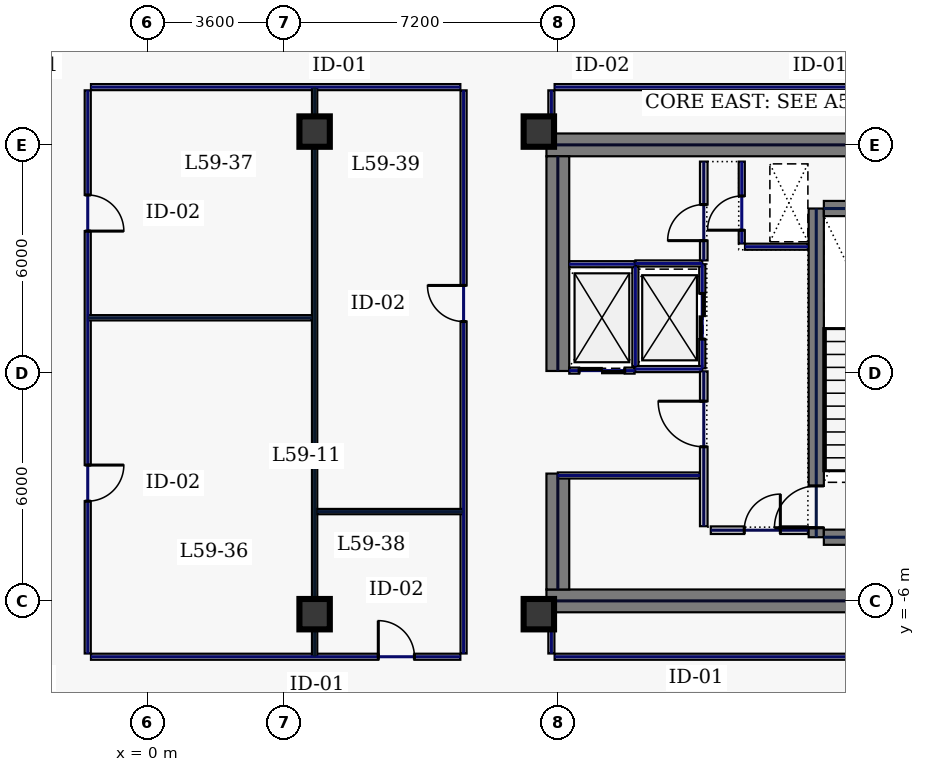
"""IFC4 building model, lengths in metres.
Left out: names, types, materials, properties, quantities, classifications, styles, units other than length and angle.
Written with IfcOpenShell. Run it as: python <this file> out.ifc"""

import sys

from ifc_helpers import new_model, si_unit, direction, frame, frame_2d, origin, origin_2d, place, context, subcontext, project, spatial, rectangle, hollow_rectangle, extrude, element, fill, save


model = new_model("IFC4")
c1 = context("Model", 3, precision=1e-05, world=origin(), true_north=direction((0.0, 1.0)))
c2 = subcontext(c1, "Body", "Model", "MODEL_VIEW")
j1 = project(units=[si_unit("LENGTHUNIT", "METRE"), si_unit("PLANEANGLEUNIT", "RADIAN")], contexts=[c1])
p1 = place(None, origin())
s1 = spatial("IfcSite", under=j1, at=p1, CompositionType="ELEMENT")
p2 = place(p1, origin())
s2 = spatial("IfcBuilding", under=s1, at=p2, CompositionType="ELEMENT")
p3 = place(p2, frame((0.0, 0.0, 255.0)))
s3 = spatial("IfcBuildingStorey", under=s2, at=p3, CompositionType="ELEMENT", Elevation=255.0)
for number, where, z_axis, x_axis in (
    (1, (10.5, 6.0, 0.0), (0.0, 0.0, 1.0), (1.0, 0.0, 0.0)),
    (2, (10.5, -6.0, 0.0), (0.0, 0.0, 1.0), (1.0, 0.0, 0.0)),
):
    element("IfcWall", number, at=place(p3, frame(where, z_axis=z_axis, x_axis=x_axis)), inside=s3, PredefinedType="SHEAR", context=c2, shape_type="SweptSolid", body=[
        extrude(rectangle(XDim=11.5, YDim=0.6, at=frame_2d((5.75, 0.0))), origin(), (0.0, 0.0, 1.0), 3.74),
    ])
p4 = place(p3, frame((10.8, -5.7, 0.0), z_axis=(0.0, 0.0, 1.0), x_axis=(0.0, 1.0, 0.0)))
e3 = element("IfcWall", 3, at=p4, inside=s3, PredefinedType="SHEAR", context=c2, shape_type="SweptSolid", body=[
    extrude(rectangle(XDim=3.05, YDim=0.6, at=frame_2d((1.525, 0.0))), origin(), (0.0, 0.0, 1.0), 3.74),
])
p5 = place(p3, frame((10.8, 0.05, 0.0), z_axis=(0.0, 0.0, 1.0), x_axis=(0.0, 1.0, 0.0)))
e4 = element("IfcWall", 4, at=p5, inside=s3, PredefinedType="SHEAR", context=c2, shape_type="SweptSolid", body=[
    extrude(rectangle(XDim=5.65, YDim=0.6, at=frame_2d((2.825, 0.0))), origin(), (0.0, 0.0, 1.0), 3.74),
])
p6 = place(p3, frame((17.6, -4.325, 0.0), z_axis=(0.0, 0.0, 1.0), x_axis=(0.0, 1.0, 0.0)))
e5 = element("IfcWall", 5, at=p6, inside=s3, PredefinedType="SHEAR", context=c2, shape_type="SweptSolid", body=[
    extrude(rectangle(XDim=8.65, YDim=0.4, at=frame_2d((4.325, 0.0))), origin(), (0.0, 0.0, 1.0), 3.74),
])
p7 = place(p6, frame((0.25, 0.0, 0.0)))
e6 = element("IfcOpeningElement", 6, at=p7, cuts=e5, PredefinedType="OPENING", context=c2, shape_type="SweptSolid", body=[
    extrude(rectangle(XDim=1.1, YDim=2.2, at=frame_2d((0.55, 1.1))), frame((0.0, 0.21, 0.0), z_axis=(0.0, -1.0, 0.0), x_axis=(1.0, 0.0, 0.0)), (0.0, 0.0, 1.0), 0.42),
])
for number, where, z_axis, x_axis in (
    (7, (17.8, -4.325, 0.0), (0.0, 0.0, 1.0), (1.0, 0.0, 0.0)),
    (8, (17.8, 4.325, 0.0), (0.0, 0.0, 1.0), (1.0, 0.0, 0.0)),
):
    element("IfcWall", number, at=place(p3, frame(where, z_axis=z_axis, x_axis=x_axis)), inside=s3, PredefinedType="SHEAR", context=c2, shape_type="SweptSolid", body=[
        extrude(rectangle(XDim=3.4, YDim=0.4, at=frame_2d((1.7, 0.0))), origin(), (0.0, 0.0, 1.0), 3.74),
    ])
for number, where, z_axis, x_axis in (
    (9, (10.3, -6.35, 0.0), (0.0, 0.0, 1.0), (1.0, 0.0, 0.0)),
    (10, (10.3, 6.35, 0.0), (0.0, 0.0, 1.0), (1.0, 0.0, 0.0)),
    (11, (4.4, -6.35, 0.0), (0.0, 0.0, 1.0), (1.0, 0.0, 0.0)),
    (12, (4.4, 6.35, 0.0), (0.0, 0.0, 1.0), (1.0, 0.0, 0.0)),
):
    element("IfcColumn", number, at=place(p3, frame(where, z_axis=z_axis, x_axis=x_axis)), inside=s3, PredefinedType="COLUMN", context=c2, shape_type="SweptSolid", body=[
        extrude(hollow_rectangle(XDim=0.8, YDim=0.8, WallThickness=0.036, at=origin_2d()), origin(), (0.0, 0.0, 1.0), 3.74),
    ])
p8 = place(p3, frame((14.6, 0.12, 0.0), z_axis=(0.0, 0.0, 1.0), x_axis=(0.0, 1.0, 0.0)))
e13 = element("IfcWall", 13, at=p8, inside=s3, PredefinedType="PARTITIONING", context=c2, shape_type="SweptSolid", body=[
    extrude(rectangle(XDim=2.74, YDim=0.16, at=frame_2d((1.37, 0.0))), origin(), (0.0, 0.0, 1.0), 3.74),
])
p9 = place(p8, frame((0.77, 0.0, 0.0)))
e14 = element("IfcOpeningElement", 14, at=p9, cuts=e13, PredefinedType="OPENING", context=c2, shape_type="SweptSolid", body=[
    extrude(rectangle(XDim=1.2, YDim=2.2, at=frame_2d((0.6, 1.1))), frame((0.0, 0.09, 0.0), z_axis=(0.0, -1.0, 0.0), x_axis=(1.0, 0.0, 0.0)), (0.0, 0.0, 1.0), 0.18),
])
for number, where, z_axis, x_axis in (
    (15, (12.84, 0.1, 0.0), (0.0, 0.0, 1.0), (1.0, 0.0, 0.0)),
    (16, (12.84, 2.88, 0.0), (0.0, 0.0, 1.0), (1.0, 0.0, 0.0)),
):
    element("IfcWall", number, at=place(p3, frame(where, z_axis=z_axis, x_axis=x_axis)), inside=s3, PredefinedType="PARTITIONING", context=c2, shape_type="SweptSolid", body=[
        extrude(rectangle(XDim=1.76, YDim=0.16, at=frame_2d((0.88, 0.0))), origin(), (0.0, 0.0, 1.0), 3.74),
    ])
p10 = place(p3, frame((12.84, 0.18, 0.0), z_axis=(0.0, 0.0, 1.0), x_axis=(0.0, 1.0, 0.0)))
e17 = element("IfcWall", 17, at=p10, inside=s3, PredefinedType="PARTITIONING", context=c2, shape_type="SweptSolid", body=[
    extrude(rectangle(XDim=2.62, YDim=0.16, at=frame_2d((1.31, 0.0))), origin(), (0.0, 0.0, 1.0), 3.74),
])
p11 = place(p3, frame((11.1, 0.06, 0.0), z_axis=(0.0, 0.0, 1.0), x_axis=(1.0, 0.0, 0.0)))
e18 = element("IfcWall", 18, at=p11, inside=s3, PredefinedType="PARTITIONING", context=c2, shape_type="SweptSolid", body=[
    extrude(rectangle(XDim=1.72, YDim=0.16, at=frame_2d((0.86, 0.0))), origin(), (0.0, 0.0, 1.0), 3.74),
])
p12 = place(p11, frame((0.26, 0.0, 0.0)))
e19 = element("IfcOpeningElement", 19, at=p12, cuts=e18, PredefinedType="OPENING", context=c2, shape_type="SweptSolid", body=[
    extrude(rectangle(XDim=1.2, YDim=2.2, at=frame_2d((0.6, 1.1))), frame((0.0, 0.09, 0.0), z_axis=(0.0, -1.0, 0.0), x_axis=(1.0, 0.0, 0.0)), (0.0, 0.0, 1.0), 0.18),
])
p13 = place(p3, frame((11.1, 2.86, 0.0), z_axis=(0.0, 0.0, 1.0), x_axis=(1.0, 0.0, 0.0)))
e20 = element("IfcWall", 20, at=p13, inside=s3, PredefinedType="PARTITIONING", context=c2, shape_type="SweptSolid", body=[
    extrude(rectangle(XDim=1.72, YDim=0.16, at=frame_2d((0.86, 0.0))), origin(), (0.0, 0.0, 1.0), 3.74),
])
p14 = place(p3, frame((15.64, 3.405, 0.0), z_axis=(0.0, 0.0, 1.0), x_axis=(0.0, 1.0, 0.0)))
e21 = element("IfcWall", 21, at=p14, inside=s3, PredefinedType="PARTITIONING", context=c2, shape_type="SweptSolid", body=[
    extrude(rectangle(XDim=2.155, YDim=0.16, at=frame_2d((1.078, 0.0))), origin(), (0.0, 0.0, 1.0), 3.74),
])
p15 = place(p14, frame((0.35, 0.0, 0.0)))
e22 = element("IfcOpeningElement", 22, at=p15, cuts=e21, PredefinedType="OPENING", context=c2, shape_type="SweptSolid", body=[
    extrude(rectangle(XDim=0.9, YDim=2.2, at=frame_2d((0.45, 1.1))), frame((0.0, 0.09, 0.0), z_axis=(0.0, -1.0, 0.0), x_axis=(1.0, 0.0, 0.0)), (0.0, 0.0, 1.0), 0.18),
])
p16 = place(p3, frame((15.725, 3.32, 0.0), z_axis=(0.0, 0.0, 1.0), x_axis=(1.0, 0.0, 0.0)))
e23 = element("IfcWall", 23, at=p16, inside=s3, PredefinedType="PARTITIONING", context=c2, shape_type="SweptSolid", body=[
    extrude(rectangle(XDim=1.655, YDim=0.16, at=frame_2d((0.827, 0.0))), origin(), (0.0, 0.0, 1.0), 3.74),
])
p17 = place(p3, frame((14.825, -4.14, 0.0), z_axis=(0.0, 0.0, 1.0), x_axis=(1.0, 0.0, 0.0)))
e24 = element("IfcWall", 24, at=p17, inside=s3, PredefinedType="SOLIDWALL", context=c2, shape_type="SweptSolid", body=[
    extrude(rectangle(XDim=2.555, YDim=0.2, at=frame_2d((1.277, 0.0))), origin(), (0.0, 0.0, 1.0), 3.74),
])
p18 = place(p17, frame((0.88, 0.0, 0.0)))
e25 = element("IfcOpeningElement", 25, at=p18, cuts=e24, PredefinedType="OPENING", context=c2, shape_type="SweptSolid", body=[
    extrude(rectangle(XDim=0.95, YDim=2.2, at=frame_2d((0.475, 1.1))), frame((0.0, 0.11, 0.0), z_axis=(0.0, -1.0, 0.0), x_axis=(1.0, 0.0, 0.0)), (0.0, 0.0, 1.0), 0.22),
])
p19 = place(p3, frame((10.8, -2.7, 0.0), z_axis=(0.0, 0.0, 1.0), x_axis=(1.0, 0.0, 0.0)))
e26 = element("IfcWall", 26, at=p19, inside=s3, PredefinedType="PARTITIONING", context=c2, shape_type="SweptSolid", body=[
    extrude(rectangle(XDim=3.735, YDim=0.16, at=frame_2d((1.867, 0.0))), origin(), (0.0, 0.0, 1.0), 3.74),
])
p20 = place(p3, frame((14.64, 2.96, 0.0), z_axis=(0.0, 0.0, 1.0), x_axis=(0.0, 1.0, 0.0)))
e27 = element("IfcWall", 27, at=p20, inside=s3, PredefinedType="SOLIDWALL", context=c2, shape_type="SweptSolid", body=[
    extrude(rectangle(XDim=2.6, YDim=0.2, at=frame_2d((1.3, 0.0))), origin(), (0.0, 0.0, 1.0), 3.74),
])
p21 = place(p20, frame((0.52, 0.0, 0.0)))
e28 = element("IfcOpeningElement", 28, at=p21, cuts=e27, PredefinedType="OPENING", context=c2, shape_type="SweptSolid", body=[
    extrude(rectangle(XDim=0.95, YDim=2.2, at=frame_2d((0.475, 1.1))), frame((0.0, 0.11, 0.0), z_axis=(0.0, -1.0, 0.0), x_axis=(1.0, 0.0, 0.0)), (0.0, 0.0, 1.0), 0.22),
])
p22 = place(p3, frame((14.64, -4.035, 0.0), z_axis=(0.0, 0.0, 1.0), x_axis=(0.0, 1.0, 0.0)))
e29 = element("IfcWall", 29, at=p22, inside=s3, PredefinedType="SOLIDWALL", context=c2, shape_type="SweptSolid", body=[
    extrude(rectangle(XDim=4.075, YDim=0.2, at=frame_2d((2.038, 0.0))), origin(), (0.0, 0.0, 1.0), 3.74),
])
p23 = place(p22, frame((2.09, 0.0, 0.0)))
e30 = element("IfcOpeningElement", 30, at=p23, cuts=e29, PredefinedType="OPENING", context=c2, shape_type="SweptSolid", body=[
    extrude(rectangle(XDim=1.2, YDim=2.2, at=frame_2d((0.6, 1.1))), frame((0.0, 0.11, 0.0), z_axis=(0.0, -1.0, 0.0), x_axis=(1.0, 0.0, 0.0)), (0.0, 0.0, 1.0), 0.22),
])
p24 = place(p3, frame((22.585, 7.52, 0.0), z_axis=(0.0, 0.0, 1.0), x_axis=(-1.0, 0.0, 0.0)))
e31 = element("IfcWall", 31, at=p24, inside=s3, PredefinedType="PARTITIONING", context=c2, shape_type="SweptSolid", body=[
    extrude(rectangle(XDim=11.87, YDim=0.16, at=frame_2d((5.935, 0.0))), origin(), (0.0, 0.0, 1.0), 3.74),
])
p25 = place(p3, frame((10.63, 7.435, 0.0), z_axis=(0.0, 0.0, 1.0), x_axis=(0.0, -1.0, 0.0)))
e32 = element("IfcWall", 32, at=p25, inside=s3, PredefinedType="PARTITIONING", context=c2, shape_type="SweptSolid", body=[
    extrude(rectangle(XDim=1.015, YDim=0.16, at=frame_2d((0.508, 0.0))), origin(), (0.0, 0.0, 1.0), 3.74),
])
p26 = place(p3, frame((10.63, -6.42, 0.0), z_axis=(0.0, 0.0, 1.0), x_axis=(0.0, -1.0, 0.0)))
e33 = element("IfcWall", 33, at=p26, inside=s3, PredefinedType="PARTITIONING", context=c2, shape_type="SweptSolid", body=[
    extrude(rectangle(XDim=0.965, YDim=0.16, at=frame_2d((0.482, 0.0))), origin(), (0.0, 0.0, 1.0), 3.74),
])
p27 = place(p3, frame((10.715, -7.47, 0.0), z_axis=(0.0, 0.0, 1.0), x_axis=(1.0, 0.0, 0.0)))
e34 = element("IfcWall", 34, at=p27, inside=s3, PredefinedType="PARTITIONING", context=c2, shape_type="SweptSolid", body=[
    extrude(rectangle(XDim=11.87, YDim=0.16, at=frame_2d((5.935, 0.0))), origin(), (0.0, 0.0, 1.0), 3.74),
])
p28 = place(p3, frame((8.235, 7.52, 0.0), z_axis=(0.0, 0.0, 1.0), x_axis=(-1.0, 0.0, 0.0)))
e35 = element("IfcWall", 35, at=p28, inside=s3, PredefinedType="PARTITIONING", context=c2, shape_type="SweptSolid", body=[
    extrude(rectangle(XDim=9.72, YDim=0.16, at=frame_2d((4.86, 0.0))), origin(), (0.0, 0.0, 1.0), 3.74),
])
p29 = place(p3, frame((-1.57, 7.435, 0.0), z_axis=(0.0, 0.0, 1.0), x_axis=(0.0, -1.0, 0.0)))
e36 = element("IfcWall", 36, at=p29, inside=s3, PredefinedType="PARTITIONING", context=c2, shape_type="SweptSolid", body=[
    extrude(rectangle(XDim=14.82, YDim=0.16, at=frame_2d((7.41, 0.0))), origin(), (0.0, 0.0, 1.0), 3.74),
])
p30 = place(p29, frame((9.861, 0.0, 0.0)))
e37 = element("IfcOpeningElement", 37, at=p30, cuts=e36, PredefinedType="OPENING", context=c2, shape_type="SweptSolid", body=[
    extrude(rectangle(XDim=0.95, YDim=2.2, at=frame_2d((0.475, 1.1))), frame((0.0, 0.09, 0.0), z_axis=(0.0, -1.0, 0.0), x_axis=(1.0, 0.0, 0.0)), (0.0, 0.0, 1.0), 0.18),
])
p31 = place(p29, frame((2.754, 0.0, 0.0)))
e38 = element("IfcOpeningElement", 38, at=p31, cuts=e36, PredefinedType="OPENING", context=c2, shape_type="SweptSolid", body=[
    extrude(rectangle(XDim=0.95, YDim=2.2, at=frame_2d((0.475, 1.1))), frame((0.0, 0.09, 0.0), z_axis=(0.0, -1.0, 0.0), x_axis=(1.0, 0.0, 0.0)), (0.0, 0.0, 1.0), 0.18),
])
p32 = place(p3, frame((-1.485, -7.47, 0.0), z_axis=(0.0, 0.0, 1.0), x_axis=(1.0, 0.0, 0.0)))
e39 = element("IfcWall", 39, at=p32, inside=s3, PredefinedType="PARTITIONING", context=c2, shape_type="SweptSolid", body=[
    extrude(rectangle(XDim=9.72, YDim=0.16, at=frame_2d((4.86, 0.0))), origin(), (0.0, 0.0, 1.0), 3.74),
])
p33 = place(p32, frame((7.561, 0.0, 0.0)))
e40 = element("IfcOpeningElement", 40, at=p33, cuts=e39, PredefinedType="OPENING", context=c2, shape_type="SweptSolid", body=[
    extrude(rectangle(XDim=0.95, YDim=2.2, at=frame_2d((0.475, 1.1))), frame((0.0, 0.09, 0.0), z_axis=(0.0, -1.0, 0.0), x_axis=(1.0, 0.0, 0.0)), (0.0, 0.0, 1.0), 0.18),
])
p34 = place(p3, frame((8.32, -7.385, 0.0), z_axis=(0.0, 0.0, 1.0), x_axis=(0.0, 1.0, 0.0)))
e41 = element("IfcWall", 41, at=p34, inside=s3, PredefinedType="PARTITIONING", context=c2, shape_type="SweptSolid", body=[
    extrude(rectangle(XDim=14.82, YDim=0.16, at=frame_2d((7.41, 0.0))), origin(), (0.0, 0.0, 1.0), 3.74),
])
p35 = place(p34, frame((8.736, 0.0, 0.0)))
e42 = element("IfcOpeningElement", 42, at=p35, cuts=e41, PredefinedType="OPENING", context=c2, shape_type="SweptSolid", body=[
    extrude(rectangle(XDim=0.95, YDim=2.2, at=frame_2d((0.475, 1.1))), frame((0.0, 0.09, 0.0), z_axis=(0.0, -1.0, 0.0), x_axis=(1.0, 0.0, 0.0)), (0.0, 0.0, 1.0), 0.18),
])
p36 = place(p3, frame((4.4, -7.465, 0.0), z_axis=(0.0, 0.0, 1.0), x_axis=(0.0, 1.0, 0.0)))
e43 = element("IfcWall", 43, at=p36, inside=s3, PredefinedType="PARTITIONING", context=c2, shape_type="SweptSolid", body=[
    extrude(rectangle(XDim=14.98, YDim=0.14, at=frame_2d((7.49, 0.0))), origin(), (0.0, 0.0, 1.0), 3.035),
])
p37 = place(p3, frame((-1.565, 1.45, 0.0), z_axis=(0.0, 0.0, 1.0), x_axis=(1.0, 0.0, 0.0)))
e44 = element("IfcWall", 44, at=p37, inside=s3, PredefinedType="PARTITIONING", context=c2, shape_type="SweptSolid", body=[
    extrude(rectangle(XDim=5.89, YDim=0.14, at=frame_2d((2.945, 0.0))), origin(), (0.0, 0.0, 1.0), 3.74),
])
p38 = place(p3, frame((4.475, -3.65, 0.0), z_axis=(0.0, 0.0, 1.0), x_axis=(1.0, 0.0, 0.0)))
e45 = element("IfcWall", 45, at=p38, inside=s3, PredefinedType="PARTITIONING", context=c2, shape_type="SweptSolid", body=[
    extrude(rectangle(XDim=3.84, YDim=0.14, at=frame_2d((1.92, 0.0))), origin(), (0.0, 0.0, 1.0), 3.74),
])
p39 = place(p7, origin())
e46 = element("IfcDoor", 46, at=p39, inside=s3, OperationType="SINGLE_SWING_LEFT", PredefinedType="DOOR", context=c2, shape_type="SweptSolid", body=[
    extrude(rectangle(XDim=1.1, YDim=2.2, at=frame_2d((0.55, 1.1))), frame((0.0, 0.025, 0.0), z_axis=(0.0, -1.0, 0.0), x_axis=(1.0, 0.0, 0.0)), (0.0, 0.0, 1.0), 0.05),
])
fill(e6, e46)
p40 = place(p9, origin())
e47 = element("IfcDoor", 47, at=p40, inside=s3, OperationType="SLIDING_TO_LEFT", PredefinedType="DOOR", context=c2, shape_type="SweptSolid", body=[
    extrude(rectangle(XDim=1.2, YDim=2.2, at=frame_2d((0.6, 1.1))), frame((0.0, 0.025, 0.0), z_axis=(0.0, -1.0, 0.0), x_axis=(1.0, 0.0, 0.0)), (0.0, 0.0, 1.0), 0.05),
])
fill(e14, e47)
p41 = place(p12, origin())
e48 = element("IfcDoor", 48, at=p41, inside=s3, OperationType="SLIDING_TO_LEFT", PredefinedType="DOOR", context=c2, shape_type="SweptSolid", body=[
    extrude(rectangle(XDim=1.2, YDim=2.2, at=frame_2d((0.6, 1.1))), frame((0.0, 0.025, 0.0), z_axis=(0.0, -1.0, 0.0), x_axis=(1.0, 0.0, 0.0)), (0.0, 0.0, 1.0), 0.05),
])
fill(e19, e48)
p42 = place(p15, origin())
e49 = element("IfcDoor", 49, at=p42, inside=s3, OperationType="SINGLE_SWING_LEFT", PredefinedType="DOOR", context=c2, shape_type="SweptSolid", body=[
    extrude(rectangle(XDim=0.9, YDim=2.2, at=frame_2d((0.45, 1.1))), frame((0.0, 0.025, 0.0), z_axis=(0.0, -1.0, 0.0), x_axis=(1.0, 0.0, 0.0)), (0.0, 0.0, 1.0), 0.05),
])
fill(e22, e49)
p43 = place(p18, origin())
e50 = element("IfcDoor", 50, at=p43, inside=s3, OperationType="SINGLE_SWING_RIGHT", PredefinedType="DOOR", context=c2, shape_type="SweptSolid", body=[
    extrude(rectangle(XDim=0.95, YDim=2.2, at=frame_2d((0.475, 1.1))), frame((0.0, 0.025, 0.0), z_axis=(0.0, -1.0, 0.0), x_axis=(1.0, 0.0, 0.0)), (0.0, 0.0, 1.0), 0.05),
])
fill(e25, e50)
p44 = place(p21, origin())
e51 = element("IfcDoor", 51, at=p44, inside=s3, OperationType="SINGLE_SWING_LEFT", PredefinedType="DOOR", context=c2, shape_type="SweptSolid", body=[
    extrude(rectangle(XDim=0.95, YDim=2.2, at=frame_2d((0.475, 1.1))), frame((0.0, 0.025, 0.0), z_axis=(0.0, -1.0, 0.0), x_axis=(1.0, 0.0, 0.0)), (0.0, 0.0, 1.0), 0.05),
])
fill(e28, e51)
p45 = place(p23, origin())
e52 = element("IfcDoor", 52, at=p45, inside=s3, OperationType="SINGLE_SWING_RIGHT", PredefinedType="DOOR", context=c2, shape_type="SweptSolid", body=[
    extrude(rectangle(XDim=1.2, YDim=2.2, at=frame_2d((0.6, 1.1))), frame((0.0, 0.025, 0.0), z_axis=(0.0, -1.0, 0.0), x_axis=(1.0, 0.0, 0.0)), (0.0, 0.0, 1.0), 0.05),
])
fill(e30, e52)
p46 = place(p30, origin())
e53 = element("IfcDoor", 53, at=p46, inside=s3, OperationType="SINGLE_SWING_LEFT", PredefinedType="DOOR", context=c2, shape_type="SweptSolid", body=[
    extrude(rectangle(XDim=0.95, YDim=2.2, at=frame_2d((0.475, 1.1))), frame((0.0, 0.025, 0.0), z_axis=(0.0, -1.0, 0.0), x_axis=(1.0, 0.0, 0.0)), (0.0, 0.0, 1.0), 0.05),
])
fill(e37, e53)
p47 = place(p31, origin())
e54 = element("IfcDoor", 54, at=p47, inside=s3, OperationType="SINGLE_SWING_RIGHT", PredefinedType="DOOR", context=c2, shape_type="SweptSolid", body=[
    extrude(rectangle(XDim=0.95, YDim=2.2, at=frame_2d((0.475, 1.1))), frame((0.0, 0.025, 0.0), z_axis=(0.0, -1.0, 0.0), x_axis=(1.0, 0.0, 0.0)), (0.0, 0.0, 1.0), 0.05),
])
fill(e38, e54)
p48 = place(p33, origin())
e55 = element("IfcDoor", 55, at=p48, inside=s3, OperationType="SINGLE_SWING_LEFT", PredefinedType="DOOR", context=c2, shape_type="SweptSolid", body=[
    extrude(rectangle(XDim=0.95, YDim=2.2, at=frame_2d((0.475, 1.1))), frame((0.0, 0.025, 0.0), z_axis=(0.0, -1.0, 0.0), x_axis=(1.0, 0.0, 0.0)), (0.0, 0.0, 1.0), 0.05),
])
fill(e40, e55)
p49 = place(p35, origin())
e56 = element("IfcDoor", 56, at=p49, inside=s3, OperationType="SINGLE_SWING_RIGHT", PredefinedType="DOOR", context=c2, shape_type="SweptSolid", body=[
    extrude(rectangle(XDim=0.95, YDim=2.2, at=frame_2d((0.475, 1.1))), frame((0.0, 0.025, 0.0), z_axis=(0.0, -1.0, 0.0), x_axis=(1.0, 0.0, 0.0)), (0.0, 0.0, 1.0), 0.05),
])
fill(e42, e56)
save(model, sys.argv[1])
